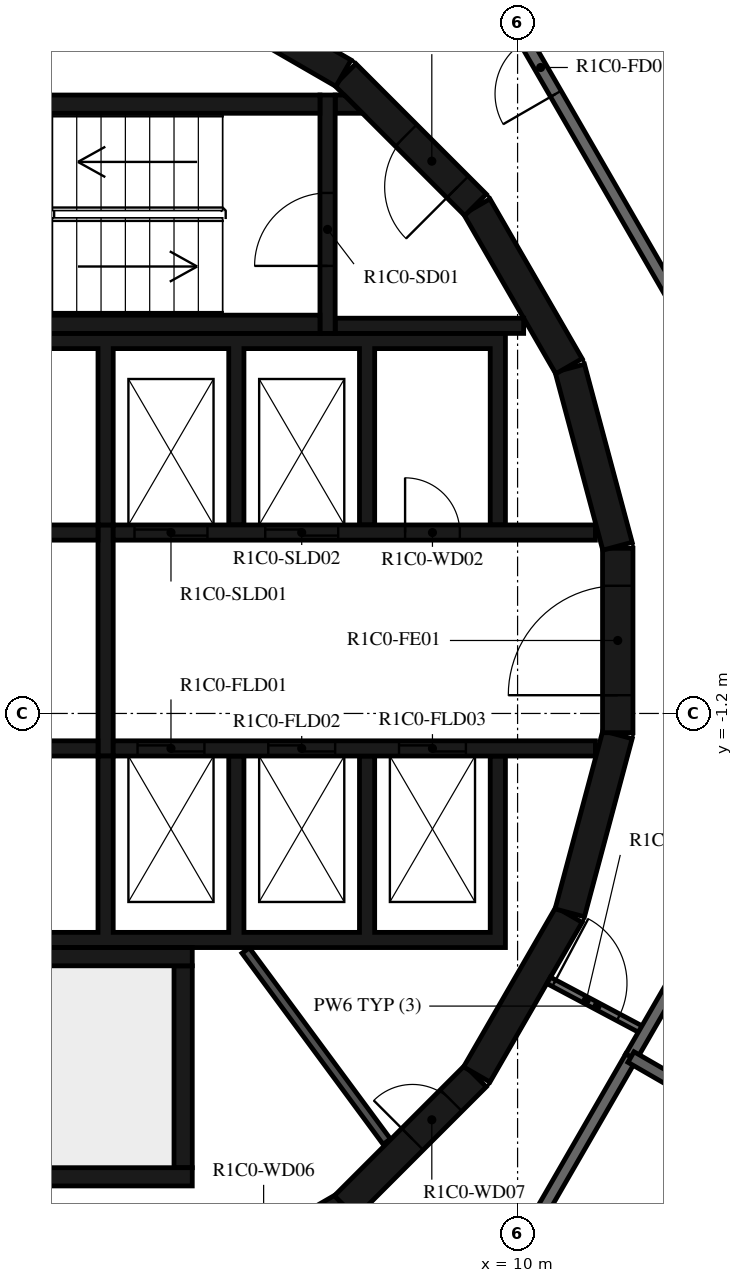
"""IFC4 building model, lengths in metres.
Left out: names, types, materials, properties, quantities, classifications, styles, units other than length and angle.
Written with IfcOpenShell. Run it as: python <this file> out.ifc"""

import sys

from ifc_helpers import new_model, si_unit, direction, frame, frame_2d, origin, place, context, subcontext, project, spatial, polyline, rectangle, outline, extrude, element, fill, save


model = new_model("IFC4")
c1 = context("Model", 3, precision=1e-05, world=origin(), true_north=direction((0.0, 1.0)))
c2 = subcontext(c1, "Body", "Model", "MODEL_VIEW")
j1 = project(units=[si_unit("LENGTHUNIT", "METRE"), si_unit("PLANEANGLEUNIT", "RADIAN")], contexts=[c1])
p1 = place(None, origin())
s1 = spatial("IfcSite", under=j1, at=p1, CompositionType="ELEMENT")
p2 = place(p1, origin())
s2 = spatial("IfcBuilding", under=s1, at=p2, CompositionType="ELEMENT")
p3 = place(p2, frame((0.0, 0.0, 59.4)))
s3 = spatial("IfcBuildingStorey", under=s2, at=p3, CompositionType="ELEMENT", Elevation=59.4)
p4 = place(p3, frame((4.51, -10.845, 0.0), z_axis=(0.0, 0.0, 1.0), x_axis=(0.865975092491, 0.500087131594, 0.0)))
e1 = element("IfcWall", 1, at=p4, inside=s3, PredefinedType="SHEAR", context=c2, shape_type="SweptSolid", body=[
    extrude(rectangle(XDim=3.033, YDim=0.5, at=frame_2d((1.516, 0.0))), origin(), (0.0, 0.0, 1.0), 3.12),
])
p5 = place(p4, frame((1.066, 0.0, 0.0)))
e2 = element("IfcOpeningElement", 2, at=p5, cuts=e1, PredefinedType="OPENING", context=c2, shape_type="SweptSolid", body=[
    extrude(rectangle(XDim=0.9, YDim=2.1, at=frame_2d((0.45, 1.05))), frame((0.0, 0.26, 0.0), z_axis=(0.0, -1.0, 0.0), x_axis=(1.0, 0.0, 0.0)), (0.0, 0.0, 1.0), 0.52),
])
p6 = place(p3, frame((7.164, -9.308, 0.0), z_axis=(0.0, 0.0, 1.0), x_axis=(0.707106781187, 0.707106781187, 0.0)))
e3 = element("IfcWall", 3, at=p6, inside=s3, PredefinedType="SHEAR", context=c2, shape_type="SweptSolid", body=[
    extrude(rectangle(XDim=3.032, YDim=0.5, at=frame_2d((1.516, 0.0))), origin(), (0.0, 0.0, 1.0), 3.12),
])
p7 = place(p6, frame((1.566, 0.0, 0.0)))
e4 = element("IfcOpeningElement", 4, at=p7, cuts=e3, PredefinedType="OPENING", context=c2, shape_type="SweptSolid", body=[
    extrude(rectangle(XDim=0.9, YDim=2.1, at=frame_2d((0.45, 1.05))), frame((0.0, 0.26, 0.0), z_axis=(0.0, -1.0, 0.0), x_axis=(1.0, 0.0, 0.0)), (0.0, 0.0, 1.0), 0.52),
])
for number, where, z_axis, x_axis in (
    (5, (9.329, -7.137, 0.0), (0.0, 0.0, 1.0), (0.5, 0.866, 0.0)),
    (6, (10.858, -4.479, 0.0), (0.0, 0.0, 1.0), (0.259, 0.966, 0.0)),
):
    element("IfcWall", number, at=place(p3, frame(where, z_axis=z_axis, x_axis=x_axis)), inside=s3, PredefinedType="SHEAR", context=c2, shape_type="SweptSolid", body=[
        extrude(rectangle(XDim=3.033, YDim=0.5, at=frame_2d((1.516, 0.0))), origin(), (0.0, 0.0, 1.0), 3.12),
    ])
p8 = place(p3, frame((11.647, -1.516, 0.0), z_axis=(0.0, 0.0, 1.0), x_axis=(0.0, 1.0, 0.0)))
e7 = element("IfcWall", 7, at=p8, inside=s3, PredefinedType="SHEAR", context=c2, shape_type="SweptSolid", body=[
    extrude(rectangle(XDim=3.033, YDim=0.5, at=frame_2d((1.516, 0.0))), origin(), (0.0, 0.0, 1.0), 3.12),
])
p9 = place(p8, frame((0.616, 0.0, 0.0)))
e8 = element("IfcOpeningElement", 8, at=p9, cuts=e7, PredefinedType="OPENING", context=c2, shape_type="SweptSolid", body=[
    extrude(rectangle(XDim=1.8, YDim=2.1, at=frame_2d((0.9, 1.05))), frame((0.0, 0.26, 0.0), z_axis=(0.0, -1.0, 0.0), x_axis=(1.0, 0.0, 0.0)), (0.0, 0.0, 1.0), 0.52),
])
for number, where, z_axis, x_axis in (
    (9, (11.643, 1.55, 0.0), (0.0, 0.0, 1.0), (-0.259, 0.966, 0.0)),
    (10, (10.845, 4.51, 0.0), (0.0, 0.0, 1.0), (-0.5, 0.866, 0.0)),
):
    element("IfcWall", number, at=place(p3, frame(where, z_axis=z_axis, x_axis=x_axis)), inside=s3, PredefinedType="SHEAR", context=c2, shape_type="SweptSolid", body=[
        extrude(rectangle(XDim=3.033, YDim=0.5, at=frame_2d((1.516, 0.0))), origin(), (0.0, 0.0, 1.0), 3.12),
    ])
p10 = place(p3, frame((9.308, 7.164, 0.0), z_axis=(0.0, 0.0, 1.0), x_axis=(-0.707106781187, 0.707106781187, 0.0)))
e11 = element("IfcWall", 11, at=p10, inside=s3, PredefinedType="SHEAR", context=c2, shape_type="SweptSolid", body=[
    extrude(rectangle(XDim=3.032, YDim=0.5, at=frame_2d((1.516, 0.0))), origin(), (0.0, 0.0, 1.0), 3.12),
])
p11 = place(p10, frame((0.416, 0.0, 0.0)))
e12 = element("IfcOpeningElement", 12, at=p11, cuts=e11, PredefinedType="OPENING", context=c2, shape_type="SweptSolid", body=[
    extrude(rectangle(XDim=1.2, YDim=2.1, at=frame_2d((0.6, 1.05))), frame((0.0, 0.26, 0.0), z_axis=(0.0, -1.0, 0.0), x_axis=(1.0, 0.0, 0.0)), (0.0, 0.0, 1.0), 0.52),
])
p12 = place(p3, frame((7.137, 9.329, 0.0), z_axis=(0.0, 0.0, 1.0), x_axis=(-0.865975092491, 0.500087131594, 0.0)))
e13 = element("IfcWall", 13, at=p12, inside=s3, PredefinedType="SHEAR", context=c2, shape_type="SweptSolid", body=[
    extrude(rectangle(XDim=3.033, YDim=0.5, at=frame_2d((1.516, 0.0))), origin(), (0.0, 0.0, 1.0), 3.12),
])
for number, where, z_axis, x_axis in (
    (14, (0.0, 5.2, 0.0), (0.0, 0.0, 1.0), (1.0, 0.0, 0.0)),
    (15, (0.0, 8.82, 0.0), (0.0, 0.0, 1.0), (1.0, 0.0, 0.0)),
):
    element("IfcWall", number, at=place(p3, frame(where, z_axis=z_axis, x_axis=x_axis)), inside=s3, PredefinedType="SHEAR", context=c2, shape_type="SweptSolid", body=[
        extrude(rectangle(XDim=6.75, YDim=0.3, at=frame_2d((3.375, 0.0))), origin(), (0.0, 0.0, 1.0), 3.12),
    ])
p13 = place(p3, frame((6.875, 5.05, 0.0), z_axis=(0.0, 0.0, 1.0), x_axis=(0.0, 1.0, 0.0)))
e16 = element("IfcWall", 16, at=p13, inside=s3, PredefinedType="SHEAR", context=c2, shape_type="SweptSolid", body=[
    extrude(rectangle(XDim=3.92, YDim=0.25, at=frame_2d((1.96, 0.0))), origin(), (0.0, 0.0, 1.0), 3.12),
])
p14 = place(p13, frame((1.11, 0.0, 0.0)))
e17 = element("IfcOpeningElement", 17, at=p14, cuts=e16, PredefinedType="OPENING", context=c2, shape_type="SweptSolid", body=[
    extrude(rectangle(XDim=1.2, YDim=2.1, at=frame_2d((0.6, 1.05))), frame((0.0, 0.135, 0.0), z_axis=(0.0, -1.0, 0.0), x_axis=(1.0, 0.0, 0.0)), (0.0, 0.0, 1.0), 0.27),
])
p15 = place(p3, frame((7.0, 5.175, 0.0), z_axis=(0.0, 0.0, 1.0), x_axis=(1.0, 0.0, 0.0)))
e18 = element("IfcWall", 18, at=p15, inside=s3, PredefinedType="SHEAR", context=c2, shape_type="SweptSolid", body=[
    extrude(rectangle(XDim=3.1, YDim=0.25, at=frame_2d((1.55, 0.0))), origin(), (0.0, 0.0, 1.0), 3.12),
])
p16 = place(p3, origin())
e19 = element("IfcWall", 19, at=p16, inside=s3, PredefinedType="SHEAR", context=c2, shape_type="SweptSolid", body=[
    extrude(outline(polyline([(7.448, 8.67), (7.0, 8.67), (7.0, 8.97), (7.148, 8.97), (7.448, 8.67)])), origin(), (0.0, 0.0, 1.0), 3.12),
])
p17 = place(p3, frame((-2.4, -5.2, 0.0), z_axis=(0.0, 0.0, 1.0), x_axis=(1.0, 0.0, 0.0)))
e20 = element("IfcWall", 20, at=p17, inside=s3, PredefinedType="SHEAR", context=c2, shape_type="SweptSolid", body=[
    extrude(rectangle(XDim=7.05, YDim=0.3, at=frame_2d((3.525, 0.0))), origin(), (0.0, 0.0, 1.0), 3.12),
])
p18 = place(p3, frame((4.5, -8.67, 0.0), z_axis=(0.0, 0.0, 1.0), x_axis=(0.0, 1.0, 0.0)))
e21 = element("IfcWall", 21, at=p18, inside=s3, PredefinedType="SHEAR", context=c2, shape_type="SweptSolid", body=[
    extrude(rectangle(XDim=3.32, YDim=0.3, at=frame_2d((1.66, 0.0))), origin(), (0.0, 0.0, 1.0), 3.12),
])
p19 = place(p3, frame((0.1, -8.82, 0.0), z_axis=(0.0, 0.0, 1.0), x_axis=(1.0, 0.0, 0.0)))
e22 = element("IfcWall", 22, at=p19, inside=s3, PredefinedType="SHEAR", context=c2, shape_type="SweptSolid", body=[
    extrude(rectangle(XDim=4.55, YDim=0.3, at=frame_2d((2.275, 0.0))), origin(), (0.0, 0.0, 1.0), 3.12),
])
p20 = place(p3, origin())
e23 = element("IfcWall", 23, at=p20, inside=s3, PredefinedType="SHEAR", context=c2, shape_type="SweptSolid", body=[
    extrude(outline(polyline([(-9.55, 4.8), (-7.65, 4.8), (-7.65, 1.9), (-7.4, 1.9), (-7.4, 4.8), (-5.5, 4.8), (-5.5, 1.9), (-5.25, 1.9), (-5.25, 4.8), (-3.35, 4.8), (-3.35, 1.9), (-3.1, 1.9), (-3.1, 4.8), (-1.2, 4.8), (-1.2, 1.9), (-0.95, 1.9), (-0.95, 4.8), (3.1, 4.8), (3.1, 1.9), (3.35, 1.9), (3.35, 4.8), (5.25, 4.8), (5.25, 1.9), (5.5, 1.9), (5.5, 4.8), (7.4, 4.8), (7.4, 1.9), (7.65, 1.9), (7.65, 4.8), (9.55, 4.8), (9.55, 1.9), (9.8, 1.9), (9.8, 4.8), (9.8, 5.05), (-9.8, 5.05), (-9.8, 4.8), (-9.8, 1.9), (-9.55, 1.9), (-9.55, 4.8)])), origin(), (0.0, 0.0, 1.0), 3.12),
])
p21 = place(p3, origin())
e24 = element("IfcWall", 24, at=p21, inside=s3, PredefinedType="SHEAR", context=c2, shape_type="SweptSolid", body=[
    extrude(outline(polyline([(9.8, -5.05), (9.8, -4.8), (9.8, -1.9), (9.55, -1.9), (9.55, -4.8), (7.65, -4.8), (7.65, -1.9), (7.4, -1.9), (7.4, -4.8), (5.5, -4.8), (5.5, -1.9), (5.25, -1.9), (5.25, -4.8), (3.35, -4.8), (3.35, -1.9), (3.1, -1.9), (3.1, -4.8), (-5.25, -4.8), (-5.25, -1.9), (-5.5, -1.9), (-5.5, -4.8), (-7.4, -4.8), (-7.4, -1.9), (-7.65, -1.9), (-7.65, -4.8), (-9.55, -4.8), (-9.55, -1.9), (-9.8, -1.9), (-9.8, -4.8), (-9.8, -5.05), (9.8, -5.05)])), origin(), (0.0, 0.0, 1.0), 3.12),
])
p22 = place(p3, frame((-11.28, 1.775, 0.0), z_axis=(0.0, 0.0, 1.0), x_axis=(1.0, 0.0, 0.0)))
e25 = element("IfcWall", 25, at=p22, inside=s3, PredefinedType="SHEAR", context=c2, shape_type="SweptSolid", body=[
    extrude(rectangle(XDim=14.38, YDim=0.25, at=frame_2d((7.19, 0.0))), origin(), (0.0, 0.0, 1.0), 3.12),
])
p23 = place(p22, frame((2.13, 0.0, 0.0)))
e26 = element("IfcOpeningElement", 26, at=p23, cuts=e25, PredefinedType="OPENING", context=c2, shape_type="SweptSolid", body=[
    extrude(rectangle(XDim=1.1, YDim=2.1, at=frame_2d((0.55, 1.05))), frame((0.0, 0.135, 0.0), z_axis=(0.0, -1.0, 0.0), x_axis=(1.0, 0.0, 0.0)), (0.0, 0.0, 1.0), 0.27),
])
p24 = place(p22, frame((4.28, 0.0, 0.0)))
e27 = element("IfcOpeningElement", 27, at=p24, cuts=e25, PredefinedType="OPENING", context=c2, shape_type="SweptSolid", body=[
    extrude(rectangle(XDim=1.1, YDim=2.1, at=frame_2d((0.55, 1.05))), frame((0.0, 0.135, 0.0), z_axis=(0.0, -1.0, 0.0), x_axis=(1.0, 0.0, 0.0)), (0.0, 0.0, 1.0), 0.27),
])
p25 = place(p22, frame((6.43, 0.0, 0.0)))
e28 = element("IfcOpeningElement", 28, at=p25, cuts=e25, PredefinedType="OPENING", context=c2, shape_type="SweptSolid", body=[
    extrude(rectangle(XDim=1.1, YDim=2.1, at=frame_2d((0.55, 1.05))), frame((0.0, 0.135, 0.0), z_axis=(0.0, -1.0, 0.0), x_axis=(1.0, 0.0, 0.0)), (0.0, 0.0, 1.0), 0.27),
])
p26 = place(p22, frame((8.58, 0.0, 0.0)))
e29 = element("IfcOpeningElement", 29, at=p26, cuts=e25, PredefinedType="OPENING", context=c2, shape_type="SweptSolid", body=[
    extrude(rectangle(XDim=1.1, YDim=2.1, at=frame_2d((0.55, 1.05))), frame((0.0, 0.135, 0.0), z_axis=(0.0, -1.0, 0.0), x_axis=(1.0, 0.0, 0.0)), (0.0, 0.0, 1.0), 0.27),
])
p27 = place(p22, frame((11.905, 0.0, 0.0)))
e30 = element("IfcOpeningElement", 30, at=p27, cuts=e25, PredefinedType="OPENING", context=c2, shape_type="SweptSolid", body=[
    extrude(rectangle(XDim=0.9, YDim=2.1, at=frame_2d((0.45, 1.05))), frame((0.0, 0.135, 0.0), z_axis=(0.0, -1.0, 0.0), x_axis=(1.0, 0.0, 0.0)), (0.0, 0.0, 1.0), 0.27),
])
p28 = place(p3, frame((3.35, 1.775, 0.0), z_axis=(0.0, 0.0, 1.0), x_axis=(1.0, 0.0, 0.0)))
e31 = element("IfcWall", 31, at=p28, inside=s3, PredefinedType="SHEAR", context=c2, shape_type="SweptSolid", body=[
    extrude(rectangle(XDim=7.93, YDim=0.25, at=frame_2d((3.965, 0.0))), origin(), (0.0, 0.0, 1.0), 3.12),
])
p29 = place(p28, frame((0.35, 0.0, 0.0)))
e32 = element("IfcOpeningElement", 32, at=p29, cuts=e31, PredefinedType="OPENING", context=c2, shape_type="SweptSolid", body=[
    extrude(rectangle(XDim=1.2, YDim=2.4, at=frame_2d((0.6, 1.2))), frame((0.0, 0.135, 0.0), z_axis=(0.0, -1.0, 0.0), x_axis=(1.0, 0.0, 0.0)), (0.0, 0.0, 1.0), 0.27),
])
p30 = place(p28, frame((2.5, 0.0, 0.0)))
e33 = element("IfcOpeningElement", 33, at=p30, cuts=e31, PredefinedType="OPENING", context=c2, shape_type="SweptSolid", body=[
    extrude(rectangle(XDim=1.2, YDim=2.4, at=frame_2d((0.6, 1.2))), frame((0.0, 0.135, 0.0), z_axis=(0.0, -1.0, 0.0), x_axis=(1.0, 0.0, 0.0)), (0.0, 0.0, 1.0), 0.27),
])
p31 = place(p28, frame((4.8, 0.0, 0.0)))
e34 = element("IfcOpeningElement", 34, at=p31, cuts=e31, PredefinedType="OPENING", context=c2, shape_type="SweptSolid", body=[
    extrude(rectangle(XDim=0.9, YDim=2.1, at=frame_2d((0.45, 1.05))), frame((0.0, 0.135, 0.0), z_axis=(0.0, -1.0, 0.0), x_axis=(1.0, 0.0, 0.0)), (0.0, 0.0, 1.0), 0.27),
])
p32 = place(p3, frame((-11.28, -1.775, 0.0), z_axis=(0.0, 0.0, 1.0), x_axis=(1.0, 0.0, 0.0)))
e35 = element("IfcWall", 35, at=p32, inside=s3, PredefinedType="SHEAR", context=c2, shape_type="SweptSolid", body=[
    extrude(rectangle(XDim=14.38, YDim=0.25, at=frame_2d((7.19, 0.0))), origin(), (0.0, 0.0, 1.0), 3.12),
])
p33 = place(p32, frame((9.755, 0.0, 0.0)))
e36 = element("IfcOpeningElement", 36, at=p33, cuts=e35, PredefinedType="OPENING", context=c2, shape_type="SweptSolid", body=[
    extrude(rectangle(XDim=0.9, YDim=2.1, at=frame_2d((0.45, 1.05))), frame((0.0, 0.135, 0.0), z_axis=(0.0, -1.0, 0.0), x_axis=(1.0, 0.0, 0.0)), (0.0, 0.0, 1.0), 0.27),
])
p34 = place(p3, frame((3.35, -1.775, 0.0), z_axis=(0.0, 0.0, 1.0), x_axis=(1.0, 0.0, 0.0)))
e37 = element("IfcWall", 37, at=p34, inside=s3, PredefinedType="SHEAR", context=c2, shape_type="SweptSolid", body=[
    extrude(rectangle(XDim=7.93, YDim=0.25, at=frame_2d((3.965, 0.0))), origin(), (0.0, 0.0, 1.0), 3.12),
])
p35 = place(p34, frame((0.4, 0.0, 0.0)))
e38 = element("IfcOpeningElement", 38, at=p35, cuts=e37, PredefinedType="OPENING", context=c2, shape_type="SweptSolid", body=[
    extrude(rectangle(XDim=1.1, YDim=2.4, at=frame_2d((0.55, 1.2))), frame((0.0, 0.135, 0.0), z_axis=(0.0, -1.0, 0.0), x_axis=(1.0, 0.0, 0.0)), (0.0, 0.0, 1.0), 0.27),
])
p36 = place(p34, frame((2.55, 0.0, 0.0)))
e39 = element("IfcOpeningElement", 39, at=p36, cuts=e37, PredefinedType="OPENING", context=c2, shape_type="SweptSolid", body=[
    extrude(rectangle(XDim=1.1, YDim=2.4, at=frame_2d((0.55, 1.2))), frame((0.0, 0.135, 0.0), z_axis=(0.0, -1.0, 0.0), x_axis=(1.0, 0.0, 0.0)), (0.0, 0.0, 1.0), 0.27),
])
p37 = place(p34, frame((4.7, 0.0, 0.0)))
e40 = element("IfcOpeningElement", 40, at=p37, cuts=e37, PredefinedType="OPENING", context=c2, shape_type="SweptSolid", body=[
    extrude(rectangle(XDim=1.1, YDim=2.4, at=frame_2d((0.55, 1.2))), frame((0.0, 0.135, 0.0), z_axis=(0.0, -1.0, 0.0), x_axis=(1.0, 0.0, 0.0)), (0.0, 0.0, 1.0), 0.27),
])
p38 = place(p3, frame((3.225, -1.9, 0.0), z_axis=(0.0, 0.0, 1.0), x_axis=(0.0, 1.0, 0.0)))
e41 = element("IfcWall", 41, at=p38, inside=s3, PredefinedType="SHEAR", context=c2, shape_type="SweptSolid", body=[
    extrude(rectangle(XDim=3.8, YDim=0.25, at=frame_2d((1.9, 0.0))), origin(), (0.0, 0.0, 1.0), 3.12),
])
p39 = place(p3, frame((5.528, -5.098, 0.0), z_axis=(0.0, 0.0, 1.0), x_axis=(0.594034318069, -0.804439698769, 0.0)))
e42 = element("IfcWall", 42, at=p39, inside=s3, PredefinedType="PARTITIONING", context=c2, shape_type="SweptSolid", body=[
    extrude(rectangle(XDim=3.907, YDim=0.15, at=frame_2d((1.953, 0.0))), origin(), (0.0, 0.0, 1.0), 3.12),
])
p40 = place(p3, frame((10.511, -5.589, 0.0), z_axis=(0.0, 0.0, 1.0), x_axis=(0.88294043061, -0.469485032769, 0.0)))
e43 = element("IfcWall", 43, at=p40, inside=s3, PredefinedType="PARTITIONING", context=c2, shape_type="SweptSolid", body=[
    extrude(rectangle(XDim=1.804, YDim=0.12, at=frame_2d((0.902, 0.0))), origin(), (0.0, 0.0, 1.0), 3.12),
])
p41 = place(p40, frame((0.1, 0.0, 0.0)))
e44 = element("IfcOpeningElement", 44, at=p41, cuts=e43, PredefinedType="OPENING", context=c2, shape_type="SweptSolid", body=[
    extrude(rectangle(XDim=1.2, YDim=2.1, at=frame_2d((0.6, 1.05))), frame((0.0, 0.07, 0.0), z_axis=(0.0, -1.0, 0.0), x_axis=(1.0, 0.0, 0.0)), (0.0, 0.0, 1.0), 0.14),
])
p42 = place(p3, frame((13.7, 3.671, 0.0), z_axis=(0.0, 0.0, 1.0), x_axis=(-0.500001669485, 0.866024439905, 0.0)))
e45 = element("IfcWall", 45, at=p42, inside=s3, PredefinedType="STANDARD", context=c2, shape_type="SweptSolid", body=[
    extrude(rectangle(XDim=7.342, YDim=0.2, at=frame_2d((3.671, 0.0))), origin(), (0.0, 0.0, 1.0), 3.12),
])
p43 = place(p42, frame((6.142, 0.0, 0.0)))
e46 = element("IfcOpeningElement", 46, at=p43, cuts=e45, PredefinedType="OPENING", context=c2, shape_type="SweptSolid", body=[
    extrude(rectangle(XDim=1.0, YDim=2.1, at=frame_2d((0.5, 1.05))), frame((0.0, 0.11, 0.0), z_axis=(0.0, -1.0, 0.0), x_axis=(1.0, 0.0, 0.0)), (0.0, 0.0, 1.0), 0.22),
])
for number, where, z_axis, x_axis in (
    (47, (11.865, -6.85, 0.0), (0.0, 0.0, 1.0), (0.5, 0.866, 0.0)),
    (48, (10.029, -10.029, 0.0), (0.0, 0.0, 1.0), (0.5, 0.866, 0.0)),
):
    element("IfcWall", number, at=place(p3, frame(where, z_axis=z_axis, x_axis=x_axis)), inside=s3, PredefinedType="STANDARD", context=c2, shape_type="SweptSolid", body=[
        extrude(rectangle(XDim=3.671, YDim=0.2, at=frame_2d((1.835, 0.0))), origin(), (0.0, 0.0, 1.0), 3.12),
    ])
p44 = place(p3, frame((16.817, -9.709, 0.0), z_axis=(0.0, 0.0, 1.0), x_axis=(-0.86604338933, 0.499968846828, 0.0)))
e49 = element("IfcWall", 49, at=p44, inside=s3, PredefinedType="STANDARD", context=c2, shape_type="SweptSolid", body=[
    extrude(rectangle(XDim=5.718, YDim=0.2, at=frame_2d((2.859, 0.0))), origin(), (0.0, 0.0, 1.0), 3.12),
])
p45 = place(p14, origin())
e50 = element("IfcDoor", 50, at=p45, inside=s3, OperationType="SINGLE_SWING_LEFT", PredefinedType="DOOR", context=c2, shape_type="SweptSolid", body=[
    extrude(rectangle(XDim=1.2, YDim=2.1, at=frame_2d((0.6, 1.05))), frame((0.0, 0.025, 0.0), z_axis=(0.0, -1.0, 0.0), x_axis=(1.0, 0.0, 0.0)), (0.0, 0.0, 1.0), 0.05),
])
fill(e17, e50)
p46 = place(p11, origin())
e51 = element("IfcDoor", 51, at=p46, inside=s3, OperationType="SINGLE_SWING_RIGHT", PredefinedType="DOOR", context=c2, shape_type="SweptSolid", body=[
    extrude(rectangle(XDim=1.2, YDim=2.1, at=frame_2d((0.6, 1.05))), frame((0.0, 0.025, 0.0), z_axis=(0.0, -1.0, 0.0), x_axis=(1.0, 0.0, 0.0)), (0.0, 0.0, 1.0), 0.05),
])
fill(e12, e51)
p47 = place(p9, origin())
e52 = element("IfcDoor", 52, at=p47, inside=s3, OperationType="DOUBLE_DOOR_SINGLE_SWING", PredefinedType="DOOR", context=c2, shape_type="SweptSolid", body=[
    extrude(rectangle(XDim=1.8, YDim=2.1, at=frame_2d((0.9, 1.05))), frame((0.0, 0.025, 0.0), z_axis=(0.0, -1.0, 0.0), x_axis=(1.0, 0.0, 0.0)), (0.0, 0.0, 1.0), 0.05),
])
fill(e8, e52)
p48 = place(p29, origin())
e53 = element("IfcDoor", 53, at=p48, inside=s3, OperationType="DOUBLE_DOOR_SLIDING", PredefinedType="DOOR", context=c2, shape_type="SweptSolid", body=[
    extrude(rectangle(XDim=1.2, YDim=2.4, at=frame_2d((0.6, 1.2))), frame((0.0, 0.025, 0.0), z_axis=(0.0, -1.0, 0.0), x_axis=(1.0, 0.0, 0.0)), (0.0, 0.0, 1.0), 0.05),
])
fill(e32, e53)
p49 = place(p30, origin())
e54 = element("IfcDoor", 54, at=p49, inside=s3, OperationType="DOUBLE_DOOR_SLIDING", PredefinedType="DOOR", context=c2, shape_type="SweptSolid", body=[
    extrude(rectangle(XDim=1.2, YDim=2.4, at=frame_2d((0.6, 1.2))), frame((0.0, 0.025, 0.0), z_axis=(0.0, -1.0, 0.0), x_axis=(1.0, 0.0, 0.0)), (0.0, 0.0, 1.0), 0.05),
])
fill(e33, e54)
p50 = place(p35, origin())
e55 = element("IfcDoor", 55, at=p50, inside=s3, OperationType="DOUBLE_DOOR_SLIDING", PredefinedType="DOOR", context=c2, shape_type="SweptSolid", body=[
    extrude(rectangle(XDim=1.1, YDim=2.4, at=frame_2d((0.55, 1.2))), frame((0.0, 0.025, 0.0), z_axis=(0.0, -1.0, 0.0), x_axis=(1.0, 0.0, 0.0)), (0.0, 0.0, 1.0), 0.05),
])
fill(e38, e55)
p51 = place(p36, origin())
e56 = element("IfcDoor", 56, at=p51, inside=s3, OperationType="DOUBLE_DOOR_SLIDING", PredefinedType="DOOR", context=c2, shape_type="SweptSolid", body=[
    extrude(rectangle(XDim=1.1, YDim=2.4, at=frame_2d((0.55, 1.2))), frame((0.0, 0.025, 0.0), z_axis=(0.0, -1.0, 0.0), x_axis=(1.0, 0.0, 0.0)), (0.0, 0.0, 1.0), 0.05),
])
fill(e39, e56)
p52 = place(p37, origin())
e57 = element("IfcDoor", 57, at=p52, inside=s3, OperationType="DOUBLE_DOOR_SLIDING", PredefinedType="DOOR", context=c2, shape_type="SweptSolid", body=[
    extrude(rectangle(XDim=1.1, YDim=2.4, at=frame_2d((0.55, 1.2))), frame((0.0, 0.025, 0.0), z_axis=(0.0, -1.0, 0.0), x_axis=(1.0, 0.0, 0.0)), (0.0, 0.0, 1.0), 0.05),
])
fill(e40, e57)
p53 = place(p31, origin())
e58 = element("IfcDoor", 58, at=p53, inside=s3, OperationType="SINGLE_SWING_LEFT", PredefinedType="DOOR", context=c2, shape_type="SweptSolid", body=[
    extrude(rectangle(XDim=0.9, YDim=2.1, at=frame_2d((0.45, 1.05))), frame((0.0, 0.025, 0.0), z_axis=(0.0, -1.0, 0.0), x_axis=(1.0, 0.0, 0.0)), (0.0, 0.0, 1.0), 0.05),
])
fill(e34, e58)
p54 = place(p7, origin())
e59 = element("IfcDoor", 59, at=p54, inside=s3, OperationType="SINGLE_SWING_RIGHT", PredefinedType="DOOR", context=c2, shape_type="SweptSolid", body=[
    extrude(rectangle(XDim=0.9, YDim=2.1, at=frame_2d((0.45, 1.05))), frame((0.0, 0.025, 0.0), z_axis=(0.0, -1.0, 0.0), x_axis=(1.0, 0.0, 0.0)), (0.0, 0.0, 1.0), 0.05),
])
fill(e4, e59)
p55 = place(p43, origin())
e60 = element("IfcDoor", 60, at=p55, inside=s3, OperationType="SINGLE_SWING_RIGHT", PredefinedType="DOOR", context=c2, shape_type="SweptSolid", body=[
    extrude(rectangle(XDim=1.0, YDim=2.1, at=frame_2d((0.5, 1.05))), frame((0.0, 0.025, 0.0), z_axis=(0.0, -1.0, 0.0), x_axis=(1.0, 0.0, 0.0)), (0.0, 0.0, 1.0), 0.05),
])
fill(e46, e60)
p56 = place(p41, origin())
e61 = element("IfcDoor", 61, at=p56, inside=s3, OperationType="DOUBLE_DOOR_SINGLE_SWING", PredefinedType="DOOR", context=c2, shape_type="SweptSolid", body=[
    extrude(rectangle(XDim=1.2, YDim=2.1, at=frame_2d((0.6, 1.05))), frame((0.0, 0.025, 0.0), z_axis=(0.0, -1.0, 0.0), x_axis=(1.0, 0.0, 0.0)), (0.0, 0.0, 1.0), 0.05),
])
fill(e44, e61)
save(model, sys.argv[1])
